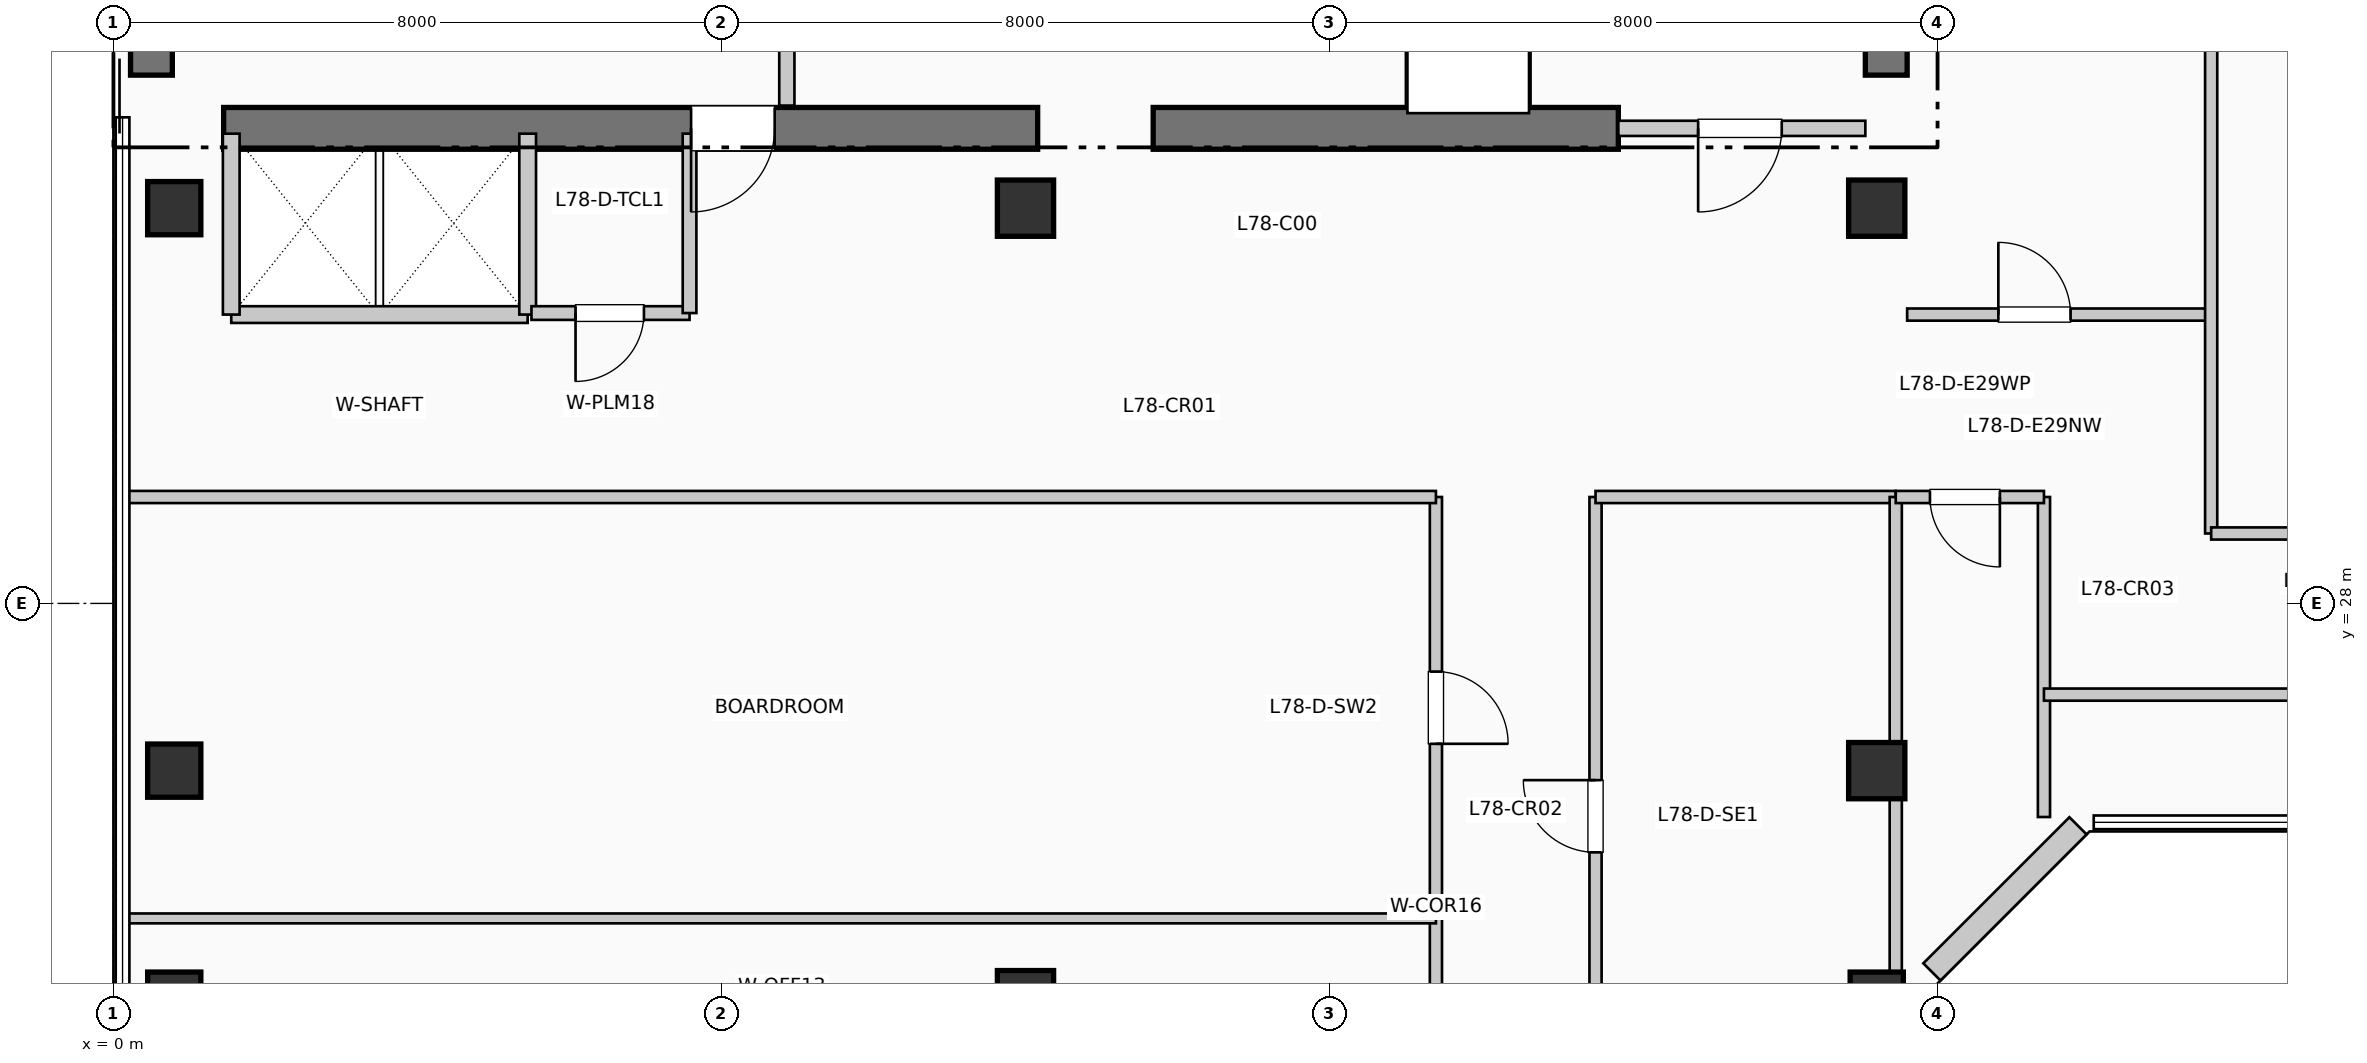
"""IFC4 building model, lengths in metres.
Left out: names, types, materials, properties, quantities, classifications, styles, units other than length and angle.
Written with IfcOpenShell. Run it as: python <this file> out.ifc"""

import sys

from ifc_helpers import new_model, si_unit, direction, frame, frame_2d, origin, origin_2d, place, context, subcontext, project, spatial, rectangle, extrude, element, fill, save


model = new_model("IFC4")
c1 = context("Model", 3, precision=1e-05, world=origin(), true_north=direction((0.0, 1.0)))
c2 = subcontext(c1, "Body", "Model", "MODEL_VIEW")
j1 = project(units=[si_unit("LENGTHUNIT", "METRE"), si_unit("PLANEANGLEUNIT", "RADIAN")], contexts=[c1])
p1 = place(None, origin())
s1 = spatial("IfcSite", under=j1, at=p1, CompositionType="ELEMENT")
p2 = place(p1, origin())
s2 = spatial("IfcBuilding", under=s1, at=p2, CompositionType="ELEMENT")
p3 = place(p2, frame((0.0, 0.0, 319.77)))
s3 = spatial("IfcBuildingStorey", under=s2, at=p3, CompositionType="ELEMENT", Elevation=319.77)
p4 = place(p3, frame((0.5, 34.95, 0.0), z_axis=(0.0, 0.0, 1.0), x_axis=(0.0, 1.0, 0.0)))
e1 = element("IfcWall", 1, at=p4, inside=s3, PredefinedType="SHEAR", context=c2, shape_type="SweptSolid", body=[
    extrude(rectangle(XDim=7.9, YDim=0.55, at=frame_2d((3.95, 0.0))), origin(), (0.0, 0.0, 1.0), 3.96),
])
p5 = place(p3, frame((23.325, 34.95, 0.0), z_axis=(0.0, 0.0, 1.0), x_axis=(0.0, 1.0, 0.0)))
e2 = element("IfcWall", 2, at=p5, inside=s3, PredefinedType="SHEAR", context=c2, shape_type="SweptSolid", body=[
    extrude(rectangle(XDim=10.64, YDim=0.55, at=frame_2d((5.32, 0.0))), origin(), (0.0, 0.0, 1.0), 3.96),
])
p6 = place(p3, frame((1.45, 34.25, 0.0), z_axis=(0.0, 0.0, 1.0), x_axis=(1.0, 0.0, 0.0)))
e3 = element("IfcWall", 3, at=p6, inside=s3, PredefinedType="SHEAR", context=c2, shape_type="SweptSolid", body=[
    extrude(rectangle(XDim=10.71, YDim=0.55, at=frame_2d((5.355, 0.0))), origin(), (0.0, 0.0, 1.0), 3.96),
])
p7 = place(p6, frame((7.25, 0.0, 0.0), z_axis=(0.0, 0.0, 1.0), x_axis=(-1.0, 0.0, 0.0)))
e4 = element("IfcOpeningElement", 4, at=p7, cuts=e3, PredefinedType="OPENING", context=c2, shape_type="SweptSolid", body=[
    extrude(rectangle(XDim=1.1, YDim=2.15, at=frame_2d((0.55, 1.075))), frame((0.0, 0.285, 0.0), z_axis=(0.0, -1.0, 0.0), x_axis=(1.0, 0.0, 0.0)), (0.0, 0.0, 1.0), 0.57),
])
p8 = place(p3, frame((13.68, 34.25, 0.0), z_axis=(0.0, 0.0, 1.0), x_axis=(1.0, 0.0, 0.0)))
e5 = element("IfcWall", 5, at=p8, inside=s3, PredefinedType="SHEAR", context=c2, shape_type="SweptSolid", body=[
    extrude(rectangle(XDim=6.12, YDim=0.55, at=frame_2d((3.06, 0.0))), origin(), (0.0, 0.0, 1.0), 3.96),
])
for number, where, z_axis, x_axis in (
    (6, (0.8, 22.8, 0.0), (0.0, 0.0, 1.0), (1.0, 0.0, 0.0)),
    (7, (0.8, 25.8, 0.0), (0.0, 0.0, 1.0), (1.0, 0.0, 0.0)),
    (8, (0.8, 33.2, 0.0), (0.0, 0.0, 1.0), (1.0, 0.0, 0.0)),
):
    element("IfcColumn", number, at=place(p3, frame(where, z_axis=z_axis, x_axis=x_axis)), inside=s3, PredefinedType="COLUMN", context=c2, shape_type="SweptSolid", body=[
        extrude(rectangle(XDim=0.7, YDim=0.7, at=origin_2d()), origin(), (0.0, 0.0, 1.0), 3.96),
    ])
for number, where, z_axis, x_axis in (
    (9, (12.0, 22.8, 0.0), (0.0, 0.0, 1.0), (1.0, 0.0, 0.0)),
    (10, (12.0, 33.2, 0.0), (0.0, 0.0, 1.0), (1.0, 0.0, 0.0)),
):
    element("IfcColumn", number, at=place(p3, frame(where, z_axis=z_axis, x_axis=x_axis)), inside=s3, PredefinedType="COLUMN", context=c2, shape_type="SweptSolid", body=[
        extrude(rectangle(XDim=0.74, YDim=0.74, at=origin_2d()), origin(), (0.0, 0.0, 1.0), 3.96),
    ])
p9 = place(p3, frame((23.2, 22.8, 0.0), z_axis=(0.0, 0.0, 1.0), x_axis=(1.0, 0.0, 0.0)))
e11 = element("IfcColumn", 11, at=p9, inside=s3, PredefinedType="COLUMN", context=c2, shape_type="SweptSolid", body=[
    extrude(rectangle(XDim=0.7, YDim=0.7, at=origin_2d()), origin(), (0.0, 0.0, 1.0), 3.96),
])
for number, where, z_axis, x_axis in (
    (12, (23.2, 25.8, 0.0), (0.0, 0.0, 1.0), (1.0, 0.0, 0.0)),
    (13, (23.2, 33.2, 0.0), (0.0, 0.0, 1.0), (1.0, 0.0, 0.0)),
):
    element("IfcColumn", number, at=place(p3, frame(where, z_axis=z_axis, x_axis=x_axis)), inside=s3, PredefinedType="COLUMN", context=c2, shape_type="SweptSolid", body=[
        extrude(rectangle(XDim=0.74, YDim=0.74, at=origin_2d()), origin(), (0.0, 0.0, 1.0), 3.96),
    ])
p10 = place(p3, frame((23.926, 23.152, 0.0), z_axis=(0.0, 0.0, 1.0), x_axis=(0.707106781187, 0.707106781187, 0.0)))
e14 = element("IfcWall", 14, at=p10, inside=s3, PredefinedType="SOLIDWALL", context=c2, shape_type="SweptSolid", body=[
    extrude(rectangle(XDim=2.718, YDim=0.32, at=frame_2d((1.359, 0.0))), origin(), (0.0, 0.0, 1.0), 3.74),
])
p11 = place(p3, frame((8.86, 34.55, 0.0), z_axis=(0.0, 0.0, 1.0), x_axis=(0.0, 1.0, 0.0)))
e15 = element("IfcWall", 15, at=p11, inside=s3, PredefinedType="PARTITIONING", context=c2, shape_type="SweptSolid", body=[
    extrude(rectangle(XDim=2.5, YDim=0.2, at=frame_2d((1.25, 0.0))), origin(), (0.0, 0.0, 1.0), 3.74),
])
p12 = place(p3, frame((19.8, 34.25, 0.0), z_axis=(0.0, 0.0, 1.0), x_axis=(1.0, 0.0, 0.0)))
e16 = element("IfcWall", 16, at=p12, inside=s3, PredefinedType="PARTITIONING", context=c2, shape_type="SweptSolid", body=[
    extrude(rectangle(XDim=3.25, YDim=0.2, at=frame_2d((1.625, 0.0))), origin(), (0.0, 0.0, 1.0), 3.74),
])
p13 = place(p12, frame((2.15, 0.0, 0.0), z_axis=(0.0, 0.0, 1.0), x_axis=(-1.0, 0.0, 0.0)))
e17 = element("IfcOpeningElement", 17, at=p13, cuts=e16, PredefinedType="OPENING", context=c2, shape_type="SweptSolid", body=[
    extrude(rectangle(XDim=1.1, YDim=2.15, at=frame_2d((0.55, 1.075))), frame((0.0, 0.11, 0.0), z_axis=(0.0, -1.0, 0.0), x_axis=(1.0, 0.0, 0.0)), (0.0, 0.0, 1.0), 0.22),
])
p14 = place(p3, frame((1.55, 31.8, 0.0), z_axis=(0.0, 0.0, 1.0), x_axis=(1.0, 0.0, 0.0)))
e18 = element("IfcWall", 18, at=p14, inside=s3, PredefinedType="PARTITIONING", context=c2, shape_type="SweptSolid", body=[
    extrude(rectangle(XDim=3.9, YDim=0.22, at=frame_2d((1.95, 0.0))), origin(), (0.0, 0.0, 1.0), 3.74),
])
for number, where, z_axis, x_axis in (
    (19, (1.55, 31.8, 0.0), (0.0, 0.0, 1.0), (0.0, 1.0, 0.0)),
    (20, (5.45, 31.8, 0.0), (0.0, 0.0, 1.0), (0.0, 1.0, 0.0)),
):
    element("IfcWall", number, at=place(p3, frame(where, z_axis=z_axis, x_axis=x_axis)), inside=s3, PredefinedType="PARTITIONING", context=c2, shape_type="SweptSolid", body=[
        extrude(rectangle(XDim=2.38, YDim=0.22, at=frame_2d((1.19, 0.0))), origin(), (0.0, 0.0, 1.0), 3.74),
    ])
p15 = place(p3, frame((5.5, 31.82, 0.0), z_axis=(0.0, 0.0, 1.0), x_axis=(1.0, 0.0, 0.0)))
e21 = element("IfcWall", 21, at=p15, inside=s3, PredefinedType="PLUMBINGWALL", context=c2, shape_type="SweptSolid", body=[
    extrude(rectangle(XDim=2.08, YDim=0.18, at=frame_2d((1.04, 0.0))), origin(), (0.0, 0.0, 1.0), 3.74),
])
p16 = place(p15, frame((1.48, 0.0, 0.0), z_axis=(0.0, 0.0, 1.0), x_axis=(-1.0, 0.0, 0.0)))
e22 = element("IfcOpeningElement", 22, at=p16, cuts=e21, PredefinedType="OPENING", context=c2, shape_type="SweptSolid", body=[
    extrude(rectangle(XDim=0.9, YDim=2.1, at=frame_2d((0.45, 1.05))), frame((0.0, 0.1, 0.0), z_axis=(0.0, -1.0, 0.0), x_axis=(1.0, 0.0, 0.0)), (0.0, 0.0, 1.0), 0.2),
])
p17 = place(p3, frame((7.58, 31.82, 0.0), z_axis=(0.0, 0.0, 1.0), x_axis=(0.0, 1.0, 0.0)))
e23 = element("IfcWall", 23, at=p17, inside=s3, PredefinedType="PLUMBINGWALL", context=c2, shape_type="SweptSolid", body=[
    extrude(rectangle(XDim=2.36, YDim=0.18, at=frame_2d((1.18, 0.0))), origin(), (0.0, 0.0, 1.0), 3.74),
])
p18 = place(p3, frame((17.4, 21.0, 0.0), z_axis=(0.0, 0.0, 1.0), x_axis=(0.0, 1.0, 0.0)))
e24 = element("IfcWall", 24, at=p18, inside=s3, PredefinedType="PARTITIONING", context=c2, shape_type="SweptSolid", body=[
    extrude(rectangle(XDim=8.4, YDim=0.16, at=frame_2d((4.2, 0.0))), origin(), (0.0, 0.0, 1.0), 3.74),
])
p19 = place(p18, frame((1.903, 0.0, 0.0), z_axis=(0.0, 0.0, 1.0), x_axis=(-1.0, 0.0, 0.0)))
e25 = element("IfcOpeningElement", 25, at=p19, cuts=e24, PredefinedType="OPENING", context=c2, shape_type="SweptSolid", body=[
    extrude(rectangle(XDim=0.95, YDim=2.15, at=frame_2d((0.475, 1.075))), frame((0.0, 0.09, 0.0), z_axis=(0.0, -1.0, 0.0), x_axis=(1.0, 0.0, 0.0)), (0.0, 0.0, 1.0), 0.18),
])
p20 = place(p18, frame((6.103, 0.0, 0.0), z_axis=(0.0, 0.0, 1.0), x_axis=(-1.0, 0.0, 0.0)))
e26 = element("IfcOpeningElement", 26, at=p20, cuts=e24, PredefinedType="OPENING", context=c2, shape_type="SweptSolid", body=[
    extrude(rectangle(XDim=0.95, YDim=2.15, at=frame_2d((0.475, 1.075))), frame((0.0, 0.09, 0.0), z_axis=(0.0, -1.0, 0.0), x_axis=(1.0, 0.0, 0.0)), (0.0, 0.0, 1.0), 0.18),
])
p21 = place(p3, frame((19.5, 21.0, 0.0), z_axis=(0.0, 0.0, 1.0), x_axis=(0.0, 1.0, 0.0)))
e27 = element("IfcWall", 27, at=p21, inside=s3, PredefinedType="PARTITIONING", context=c2, shape_type="SweptSolid", body=[
    extrude(rectangle(XDim=8.4, YDim=0.16, at=frame_2d((4.2, 0.0))), origin(), (0.0, 0.0, 1.0), 3.74),
])
p22 = place(p21, frame((3.725, 0.0, 0.0)))
e28 = element("IfcOpeningElement", 28, at=p22, cuts=e27, PredefinedType="OPENING", context=c2, shape_type="SweptSolid", body=[
    extrude(rectangle(XDim=0.95, YDim=2.15, at=frame_2d((0.475, 1.075))), frame((0.0, 0.09, 0.0), z_axis=(0.0, -1.0, 0.0), x_axis=(1.0, 0.0, 0.0)), (0.0, 0.0, 1.0), 0.18),
])
p23 = place(p3, frame((0.19, 29.4, 0.0), z_axis=(0.0, 0.0, 1.0), x_axis=(1.0, 0.0, 0.0)))
e29 = element("IfcWall", 29, at=p23, inside=s3, PredefinedType="PARTITIONING", context=c2, shape_type="SweptSolid", body=[
    extrude(rectangle(XDim=17.21, YDim=0.16, at=frame_2d((8.605, 0.0))), origin(), (0.0, 0.0, 1.0), 3.425),
])
p24 = place(p3, frame((19.5, 29.4, 0.0), z_axis=(0.0, 0.0, 1.0), x_axis=(1.0, 0.0, 0.0)))
e30 = element("IfcWall", 30, at=p24, inside=s3, PredefinedType="PARTITIONING", context=c2, shape_type="SweptSolid", body=[
    extrude(rectangle(XDim=3.95, YDim=0.16, at=frame_2d((1.975, 0.0))), origin(), (0.0, 0.0, 1.0), 3.425),
])
p25 = place(p3, frame((23.45, 5.99, 0.0), z_axis=(0.0, 0.0, 1.0), x_axis=(0.0, 1.0, 0.0)))
e31 = element("IfcWall", 31, at=p25, inside=s3, PredefinedType="PARTITIONING", context=c2, shape_type="SweptSolid", body=[
    extrude(rectangle(XDim=23.41, YDim=0.16, at=frame_2d((11.705, 0.0))), origin(), (0.0, 0.0, 1.0), 3.175),
])
p26 = place(p3, frame((0.19, 23.856, 0.0), z_axis=(0.0, 0.0, 1.0), x_axis=(1.0, 0.0, 0.0)))
e32 = element("IfcWall", 32, at=p26, inside=s3, PredefinedType="PARTITIONING", context=c2, shape_type="SweptSolid", body=[
    extrude(rectangle(XDim=17.21, YDim=0.13, at=frame_2d((8.605, 0.0))), origin(), (0.0, 0.0, 1.0), 3.74),
])
p27 = place(p3, frame((25.4, 25.19, 0.0), z_axis=(0.0, 0.0, 1.0), x_axis=(0.0, 1.0, 0.0)))
e33 = element("IfcWall", 33, at=p27, inside=s3, PredefinedType="PARTITIONING", context=c2, shape_type="SweptSolid", body=[
    extrude(rectangle(XDim=4.21, YDim=0.16, at=frame_2d((2.105, 0.0))), origin(), (0.0, 0.0, 1.0), 3.74),
])
p28 = place(p3, frame((23.6, 31.8, 0.0), z_axis=(0.0, 0.0, 1.0), x_axis=(1.0, 0.0, 0.0)))
e34 = element("IfcWall", 34, at=p28, inside=s3, PredefinedType="PARTITIONING", context=c2, shape_type="SweptSolid", body=[
    extrude(rectangle(XDim=4.0, YDim=0.16, at=frame_2d((2.0, 0.0))), origin(), (0.0, 0.0, 1.0), 3.74),
])
p29 = place(p28, frame((1.2, 0.0, 0.0)))
e35 = element("IfcOpeningElement", 35, at=p29, cuts=e34, PredefinedType="OPENING", context=c2, shape_type="SweptSolid", body=[
    extrude(rectangle(XDim=0.95, YDim=2.15, at=frame_2d((0.475, 1.075))), frame((0.0, 0.09, 0.0), z_axis=(0.0, -1.0, 0.0), x_axis=(1.0, 0.0, 0.0)), (0.0, 0.0, 1.0), 0.18),
])
p30 = place(p3, frame((27.6, 28.92, 0.0), z_axis=(0.0, 0.0, 1.0), x_axis=(0.0, 1.0, 0.0)))
e36 = element("IfcWall", 36, at=p30, inside=s3, PredefinedType="PARTITIONING", context=c2, shape_type="SweptSolid", body=[
    extrude(rectangle(XDim=16.89, YDim=0.16, at=frame_2d((8.445, 0.0))), origin(), (0.0, 0.0, 1.0), 3.74),
])
p31 = place(p3, frame((25.4, 26.8, 0.0), z_axis=(0.0, 0.0, 1.0), x_axis=(1.0, 0.0, 0.0)))
e37 = element("IfcWall", 37, at=p31, inside=s3, PredefinedType="PARTITIONING", context=c2, shape_type="SweptSolid", body=[
    extrude(rectangle(XDim=18.81, YDim=0.16, at=frame_2d((9.405, 0.0))), origin(), (0.0, 0.0, 1.0), 3.74),
])
p32 = place(p31, frame((4.45, 0.0, 0.0), z_axis=(0.0, 0.0, 1.0), x_axis=(-1.0, 0.0, 0.0)))
e38 = element("IfcOpeningElement", 38, at=p32, cuts=e37, PredefinedType="OPENING", context=c2, shape_type="SweptSolid", body=[
    extrude(rectangle(XDim=0.95, YDim=2.15, at=frame_2d((0.475, 1.075))), frame((0.0, 0.09, 0.0), z_axis=(0.0, -1.0, 0.0), x_axis=(1.0, 0.0, 0.0)), (0.0, 0.0, 1.0), 0.18),
])
p33 = place(p3, frame((27.6, 28.92, 0.0), z_axis=(0.0, 0.0, 1.0), x_axis=(1.0, 0.0, 0.0)))
e39 = element("IfcWall", 39, at=p33, inside=s3, PredefinedType="PARTITIONING", context=c2, shape_type="SweptSolid", body=[
    extrude(rectangle(XDim=16.61, YDim=0.16, at=frame_2d((8.305, 0.0))), origin(), (0.0, 0.0, 1.0), 3.74),
])
p34 = place(p33, frame((2.5, 0.0, 0.0)))
e40 = element("IfcOpeningElement", 40, at=p34, cuts=e39, PredefinedType="OPENING", context=c2, shape_type="SweptSolid", body=[
    extrude(rectangle(XDim=0.95, YDim=2.15, at=frame_2d((0.475, 1.075))), frame((0.0, 0.09, 0.0), z_axis=(0.0, -1.0, 0.0), x_axis=(1.0, 0.0, 0.0)), (0.0, 0.0, 1.0), 0.18),
])
p35 = place(p33, frame((11.0, 0.0, 0.0)))
e41 = element("IfcOpeningElement", 41, at=p35, cuts=e39, PredefinedType="OPENING", context=c2, shape_type="SweptSolid", body=[
    extrude(rectangle(XDim=0.95, YDim=2.15, at=frame_2d((0.475, 1.075))), frame((0.0, 0.09, 0.0), z_axis=(0.0, -1.0, 0.0), x_axis=(1.0, 0.0, 0.0)), (0.0, 0.0, 1.0), 0.18),
])
p36 = place(p3, frame((23.45, 29.4, 0.0), z_axis=(0.0, 0.0, 1.0), x_axis=(1.0, 0.0, 0.0)))
e42 = element("IfcWall", 42, at=p36, inside=s3, PredefinedType="PARTITIONING", context=c2, shape_type="SweptSolid", body=[
    extrude(rectangle(XDim=1.95, YDim=0.16, at=frame_2d((0.975, 0.0))), origin(), (0.0, 0.0, 1.0), 3.425),
])
p37 = place(p36, frame((1.37, 0.0, 0.0), z_axis=(0.0, 0.0, 1.0), x_axis=(-1.0, 0.0, 0.0)))
e43 = element("IfcOpeningElement", 43, at=p37, cuts=e42, PredefinedType="OPENING", context=c2, shape_type="SweptSolid", body=[
    extrude(rectangle(XDim=0.92, YDim=2.1, at=frame_2d((0.46, 1.05))), frame((0.0, 0.09, 0.0), z_axis=(0.0, -1.0, 0.0), x_axis=(1.0, 0.0, 0.0)), (0.0, 0.0, 1.0), 0.18),
])
p38 = place(p7, origin())
e44 = element("IfcDoor", 44, at=p38, inside=s3, OperationType="SINGLE_SWING_LEFT", PredefinedType="DOOR", context=c2, shape_type="SweptSolid", body=[
    extrude(rectangle(XDim=1.1, YDim=2.15, at=frame_2d((0.55, 1.075))), frame((0.0, 0.025, 0.0), z_axis=(0.0, -1.0, 0.0), x_axis=(1.0, 0.0, 0.0)), (0.0, 0.0, 1.0), 0.05),
])
fill(e4, e44)
p39 = place(p13, origin())
e45 = element("IfcDoor", 45, at=p39, inside=s3, OperationType="SINGLE_SWING_LEFT", PredefinedType="DOOR", context=c2, shape_type="SweptSolid", body=[
    extrude(rectangle(XDim=1.1, YDim=2.15, at=frame_2d((0.55, 1.075))), frame((0.0, 0.025, 0.0), z_axis=(0.0, -1.0, 0.0), x_axis=(1.0, 0.0, 0.0)), (0.0, 0.0, 1.0), 0.05),
])
fill(e17, e45)
p40 = place(p16, origin())
e46 = element("IfcDoor", 46, at=p40, inside=s3, OperationType="SINGLE_SWING_LEFT", PredefinedType="DOOR", context=c2, shape_type="SweptSolid", body=[
    extrude(rectangle(XDim=0.9, YDim=2.1, at=frame_2d((0.45, 1.05))), frame((0.0, 0.025, 0.0), z_axis=(0.0, -1.0, 0.0), x_axis=(1.0, 0.0, 0.0)), (0.0, 0.0, 1.0), 0.05),
])
fill(e22, e46)
p41 = place(p20, origin())
e47 = element("IfcDoor", 47, at=p41, inside=s3, OperationType="SINGLE_SWING_LEFT", PredefinedType="DOOR", context=c2, shape_type="SweptSolid", body=[
    extrude(rectangle(XDim=0.95, YDim=2.15, at=frame_2d((0.475, 1.075))), frame((0.0, 0.025, 0.0), z_axis=(0.0, -1.0, 0.0), x_axis=(1.0, 0.0, 0.0)), (0.0, 0.0, 1.0), 0.05),
])
fill(e26, e47)
p42 = place(p22, origin())
e48 = element("IfcDoor", 48, at=p42, inside=s3, OperationType="SINGLE_SWING_RIGHT", PredefinedType="DOOR", context=c2, shape_type="SweptSolid", body=[
    extrude(rectangle(XDim=0.95, YDim=2.15, at=frame_2d((0.475, 1.075))), frame((0.0, 0.025, 0.0), z_axis=(0.0, -1.0, 0.0), x_axis=(1.0, 0.0, 0.0)), (0.0, 0.0, 1.0), 0.05),
])
fill(e28, e48)
p43 = place(p29, origin())
e49 = element("IfcDoor", 49, at=p43, inside=s3, OperationType="SINGLE_SWING_LEFT", PredefinedType="DOOR", context=c2, shape_type="SweptSolid", body=[
    extrude(rectangle(XDim=0.95, YDim=2.15, at=frame_2d((0.475, 1.075))), frame((0.0, 0.025, 0.0), z_axis=(0.0, -1.0, 0.0), x_axis=(1.0, 0.0, 0.0)), (0.0, 0.0, 1.0), 0.05),
])
fill(e35, e49)
p44 = place(p37, origin())
e50 = element("IfcDoor", 50, at=p44, inside=s3, OperationType="SINGLE_SWING_RIGHT", PredefinedType="DOOR", context=c2, shape_type="SweptSolid", body=[
    extrude(rectangle(XDim=0.92, YDim=2.1, at=frame_2d((0.46, 1.05))), frame((0.0, 0.025, 0.0), z_axis=(0.0, -1.0, 0.0), x_axis=(1.0, 0.0, 0.0)), (0.0, 0.0, 1.0), 0.05),
])
fill(e43, e50)
save(model, sys.argv[1])
